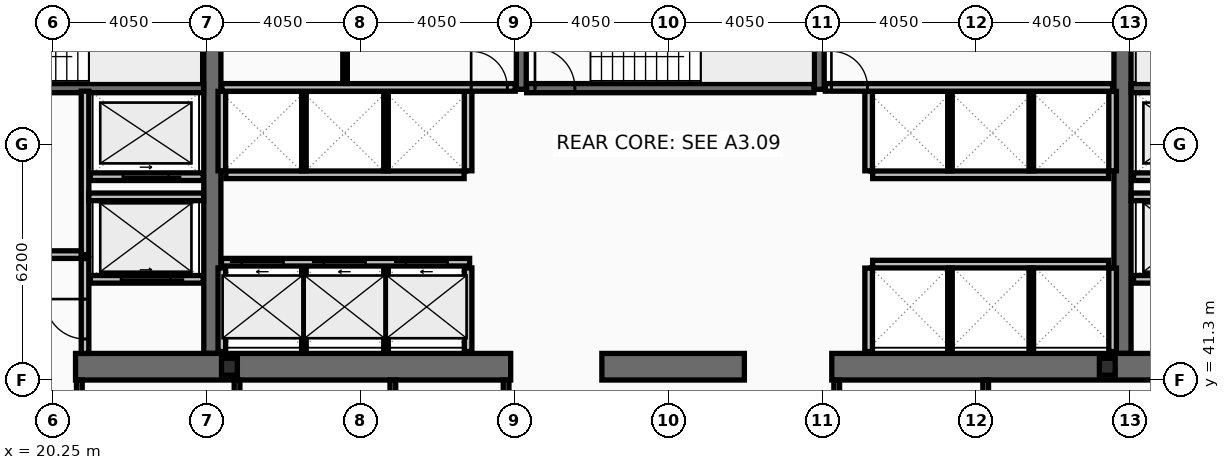
"""IFC4 building model, lengths in metres.
Left out: names, types, materials, properties, quantities, classifications, styles, units other than length and angle.
Written with IfcOpenShell. Run it as: python <this file> out.ifc"""

import sys

from ifc_helpers import new_model, si_unit, direction, frame, frame_2d, origin, origin_2d, place, context, subcontext, project, spatial, rectangle, i_section, extrude, element, fill, save


model = new_model("IFC4")
c1 = context("Model", 3, precision=1e-05, world=origin(), true_north=direction((0.0, 1.0)))
c2 = subcontext(c1, "Body", "Model", "MODEL_VIEW")
j1 = project(units=[si_unit("LENGTHUNIT", "METRE"), si_unit("PLANEANGLEUNIT", "RADIAN")], contexts=[c1])
p1 = place(None, origin())
s1 = spatial("IfcSite", under=j1, at=p1, CompositionType="ELEMENT")
p2 = place(p1, origin())
s2 = spatial("IfcBuilding", under=s1, at=p2, CompositionType="ELEMENT")
p3 = place(p2, frame((0.0, 0.0, 111.0)))
s3 = spatial("IfcBuildingStorey", under=s2, at=p3, CompositionType="ELEMENT", Elevation=111.0)
for number, where, z_axis, x_axis in (
    (1, (24.45, 42.0, 0.0), (0.0, 0.0, 1.0), (0.0, 1.0, 0.0)),
    (2, (48.4, 42.0, 0.0), (0.0, 0.0, 1.0), (0.0, 1.0, 0.0)),
):
    element("IfcWall", number, at=place(p3, frame(where, z_axis=z_axis, x_axis=x_axis)), inside=s3, PredefinedType="SHEAR", context=c2, shape_type="SweptSolid", body=[
        extrude(rectangle(XDim=11.0, YDim=0.45, at=frame_2d((5.5, 0.0))), origin(), (0.0, 0.0, 1.0), 3.44),
    ])
p4 = place(p3, frame((32.3, 41.65, 0.0), z_axis=(0.0, 0.0, 1.0), x_axis=(-1.0, 0.0, 0.0)))
e3 = element("IfcWall", 3, at=p4, inside=s3, PredefinedType="SHEAR", context=c2, shape_type="SweptSolid", body=[
    extrude(rectangle(XDim=11.45, YDim=0.7, at=frame_2d((5.725, 0.0))), origin(), (0.0, 0.0, 1.0), 3.44),
])
p5 = place(p3, frame((38.45, 41.65, 0.0), z_axis=(0.0, 0.0, 1.0), x_axis=(-1.0, 0.0, 0.0)))
e4 = element("IfcWall", 4, at=p5, inside=s3, PredefinedType="SHEAR", context=c2, shape_type="SweptSolid", body=[
    extrude(rectangle(XDim=3.75, YDim=0.7, at=frame_2d((1.875, 0.0))), origin(), (0.0, 0.0, 1.0), 3.44),
])
p6 = place(p3, frame((52.05, 41.65, 0.0), z_axis=(0.0, 0.0, 1.0), x_axis=(-1.0, 0.0, 0.0)))
e5 = element("IfcWall", 5, at=p6, inside=s3, PredefinedType="SHEAR", context=c2, shape_type="SweptSolid", body=[
    extrude(rectangle(XDim=11.3, YDim=0.7, at=frame_2d((5.65, 0.0))), origin(), (0.0, 0.0, 1.0), 3.44),
])
for number, where, z_axis, x_axis in (
    (6, (32.58, 48.95, 0.0), (0.0, 0.0, 1.0), (0.0, 1.0, 0.0)),
    (7, (40.42, 48.95, 0.0), (0.0, 0.0, 1.0), (0.0, 1.0, 0.0)),
):
    element("IfcWall", number, at=place(p3, frame(where, z_axis=z_axis, x_axis=x_axis)), inside=s3, PredefinedType="SHEAR", context=c2, shape_type="SweptSolid", body=[
        extrude(rectangle(XDim=4.05, YDim=0.26, at=frame_2d((2.025, 0.0))), origin(), (0.0, 0.0, 1.0), 3.44),
    ])
p7 = place(p3, frame((16.9, 48.98, 0.0), z_axis=(0.0, 0.0, 1.0), x_axis=(1.0, 0.0, 0.0)))
e8 = element("IfcWall", 8, at=p7, inside=s3, PredefinedType="SHEAR", context=c2, shape_type="SweptSolid", body=[
    extrude(rectangle(XDim=7.32, YDim=0.24, at=frame_2d((3.66, 0.0))), origin(), (0.0, 0.0, 1.0), 3.44),
])
p8 = place(p7, frame((0.22, 0.0, 0.0)))
e9 = element("IfcOpeningElement", 9, at=p8, cuts=e8, PredefinedType="OPENING", context=c2, shape_type="SweptSolid", body=[
    extrude(rectangle(XDim=1.05, YDim=2.15, at=frame_2d((0.525, 1.075))), frame((0.0, 0.13, 0.0), z_axis=(0.0, -1.0, 0.0), x_axis=(1.0, 0.0, 0.0)), (0.0, 0.0, 1.0), 0.26),
])
p9 = place(p3, frame((48.63, 48.98, 0.0), z_axis=(0.0, 0.0, 1.0), x_axis=(1.0, 0.0, 0.0)))
e10 = element("IfcWall", 10, at=p9, inside=s3, PredefinedType="SHEAR", context=c2, shape_type="SweptSolid", body=[
    extrude(rectangle(XDim=7.37, YDim=0.24, at=frame_2d((3.685, 0.0))), origin(), (0.0, 0.0, 1.0), 3.44),
])
p10 = place(p9, frame((6.1, 0.0, 0.0)))
e11 = element("IfcOpeningElement", 11, at=p10, cuts=e10, PredefinedType="OPENING", context=c2, shape_type="SweptSolid", body=[
    extrude(rectangle(XDim=1.05, YDim=2.15, at=frame_2d((0.525, 1.075))), frame((0.0, 0.13, 0.0), z_axis=(0.0, -1.0, 0.0), x_axis=(1.0, 0.0, 0.0)), (0.0, 0.0, 1.0), 0.26),
])
p11 = place(p3, frame((32.72, 48.98, 0.0), z_axis=(0.0, 0.0, 1.0), x_axis=(1.0, 0.0, 0.0)))
e12 = element("IfcWall", 12, at=p11, inside=s3, PredefinedType="SHEAR", context=c2, shape_type="SweptSolid", body=[
    extrude(rectangle(XDim=7.56, YDim=0.24, at=frame_2d((3.78, 0.0))), origin(), (0.0, 0.0, 1.0), 3.44),
])
p12 = place(p11, frame((0.22, 0.0, 0.0)))
e13 = element("IfcOpeningElement", 13, at=p12, cuts=e12, PredefinedType="OPENING", context=c2, shape_type="SweptSolid", body=[
    extrude(rectangle(XDim=1.05, YDim=2.15, at=frame_2d((0.525, 1.075))), frame((0.0, 0.13, 0.0), z_axis=(0.0, -1.0, 0.0), x_axis=(1.0, 0.0, 0.0)), (0.0, 0.0, 1.0), 0.26),
])
for number, where, z_axis, x_axis in (
    (14, (24.9, 41.65, 0.0), (0.0, 0.0, 1.0), (1.0, 0.0, 0.0)),
    (15, (48.0, 41.65, 0.0), (0.0, 0.0, 1.0), (1.0, 0.0, 0.0)),
):
    element("IfcColumn", number, at=place(p3, frame(where, z_axis=z_axis, x_axis=x_axis)), inside=s3, PredefinedType="COLUMN", context=c2, shape_type="SweptSolid", body=[
        extrude(i_section(OverallWidth=0.416, OverallDepth=0.446, WebThickness=0.039, FlangeThickness=0.063, at=origin_2d()), origin(), (0.0, 0.0, 1.0), 3.6),
    ])
p13 = place(p3, frame((24.69, 44.4, 0.0), z_axis=(0.0, 0.0, 1.0), x_axis=(1.0, 0.0, 0.0)))
e16 = element("IfcWall", 16, at=p13, inside=s3, PredefinedType="PARTITIONING", context=c2, shape_type="SweptSolid", body=[
    extrude(rectangle(XDim=6.53, YDim=0.2, at=frame_2d((3.265, 0.0))), origin(), (0.0, 0.0, 1.0), 3.44),
])
p14 = place(p13, frame((0.53, 0.0, 0.0)))
e17 = element("IfcOpeningElement", 17, at=p14, cuts=e16, PredefinedType="OPENING", context=c2, shape_type="SweptSolid", body=[
    extrude(rectangle(XDim=1.1, YDim=2.18, at=frame_2d((0.55, 1.09))), frame((0.0, 0.11, 0.0), z_axis=(0.0, -1.0, 0.0), x_axis=(1.0, 0.0, 0.0)), (0.0, 0.0, 1.0), 0.22),
])
p15 = place(p13, frame((2.69, 0.0, 0.0)))
e18 = element("IfcOpeningElement", 18, at=p15, cuts=e16, PredefinedType="OPENING", context=c2, shape_type="SweptSolid", body=[
    extrude(rectangle(XDim=1.1, YDim=2.18, at=frame_2d((0.55, 1.09))), frame((0.0, 0.11, 0.0), z_axis=(0.0, -1.0, 0.0), x_axis=(1.0, 0.0, 0.0)), (0.0, 0.0, 1.0), 0.22),
])
p16 = place(p13, frame((4.85, 0.0, 0.0)))
e19 = element("IfcOpeningElement", 19, at=p16, cuts=e16, PredefinedType="OPENING", context=c2, shape_type="SweptSolid", body=[
    extrude(rectangle(XDim=1.1, YDim=2.18, at=frame_2d((0.55, 1.09))), frame((0.0, 0.11, 0.0), z_axis=(0.0, -1.0, 0.0), x_axis=(1.0, 0.0, 0.0)), (0.0, 0.0, 1.0), 0.22),
])
p17 = place(p3, frame((51.61, 43.95, 0.0), z_axis=(0.0, 0.0, 1.0), x_axis=(-1.0, 0.0, 0.0)))
e20 = element("IfcWall", 20, at=p17, inside=s3, PredefinedType="PARTITIONING", context=c2, shape_type="SweptSolid", body=[
    extrude(rectangle(XDim=2.92, YDim=0.2, at=frame_2d((1.46, 0.0))), origin(), (0.0, 0.0, 1.0), 3.44),
])
p18 = place(p17, frame((0.81, 0.0, 0.0)))
e21 = element("IfcOpeningElement", 21, at=p18, cuts=e20, PredefinedType="OPENING", context=c2, shape_type="SweptSolid", body=[
    extrude(rectangle(XDim=1.3, YDim=2.18, at=frame_2d((0.65, 1.09))), frame((0.0, 0.11, 0.0), z_axis=(0.0, -1.0, 0.0), x_axis=(1.0, 0.0, 0.0)), (0.0, 0.0, 1.0), 0.22),
])
p19 = place(p3, frame((24.21, 43.95, 0.0), z_axis=(0.0, 0.0, 1.0), x_axis=(-1.0, 0.0, 0.0)))
e22 = element("IfcWall", 22, at=p19, inside=s3, PredefinedType="PARTITIONING", context=c2, shape_type="SweptSolid", body=[
    extrude(rectangle(XDim=2.97, YDim=0.2, at=frame_2d((1.485, 0.0))), origin(), (0.0, 0.0, 1.0), 3.44),
])
p20 = place(p19, frame((0.86, 0.0, 0.0)))
e23 = element("IfcOpeningElement", 23, at=p20, cuts=e22, PredefinedType="OPENING", context=c2, shape_type="SweptSolid", body=[
    extrude(rectangle(XDim=1.3, YDim=2.18, at=frame_2d((0.65, 1.09))), frame((0.0, 0.11, 0.0), z_axis=(0.0, -1.0, 0.0), x_axis=(1.0, 0.0, 0.0)), (0.0, 0.0, 1.0), 0.22),
])
p21 = place(p3, frame((51.61, 46.65, 0.0), z_axis=(0.0, 0.0, 1.0), x_axis=(-1.0, 0.0, 0.0)))
e24 = element("IfcWall", 24, at=p21, inside=s3, PredefinedType="PARTITIONING", context=c2, shape_type="SweptSolid", body=[
    extrude(rectangle(XDim=2.92, YDim=0.2, at=frame_2d((1.46, 0.0))), origin(), (0.0, 0.0, 1.0), 3.44),
])
p22 = place(p21, frame((0.86, 0.0, 0.0)))
e25 = element("IfcOpeningElement", 25, at=p22, cuts=e24, PredefinedType="OPENING", context=c2, shape_type="SweptSolid", body=[
    extrude(rectangle(XDim=1.2, YDim=2.18, at=frame_2d((0.6, 1.09))), frame((0.0, 0.11, 0.0), z_axis=(0.0, -1.0, 0.0), x_axis=(1.0, 0.0, 0.0)), (0.0, 0.0, 1.0), 0.22),
])
p23 = place(p3, frame((24.21, 46.65, 0.0), z_axis=(0.0, 0.0, 1.0), x_axis=(-1.0, 0.0, 0.0)))
e26 = element("IfcWall", 26, at=p23, inside=s3, PredefinedType="PARTITIONING", context=c2, shape_type="SweptSolid", body=[
    extrude(rectangle(XDim=2.97, YDim=0.2, at=frame_2d((1.485, 0.0))), origin(), (0.0, 0.0, 1.0), 3.44),
])
p24 = place(p23, frame((0.91, 0.0, 0.0)))
e27 = element("IfcOpeningElement", 27, at=p24, cuts=e26, PredefinedType="OPENING", context=c2, shape_type="SweptSolid", body=[
    extrude(rectangle(XDim=1.2, YDim=2.18, at=frame_2d((0.6, 1.09))), frame((0.0, 0.11, 0.0), z_axis=(0.0, -1.0, 0.0), x_axis=(1.0, 0.0, 0.0)), (0.0, 0.0, 1.0), 0.22),
])
p25 = place(p3, frame((21.1, 44.6, 0.0), z_axis=(0.0, 0.0, 1.0), x_axis=(0.0, 1.0, 0.0)))
e28 = element("IfcWall", 28, at=p25, inside=s3, PredefinedType="PARTITIONING", context=c2, shape_type="SweptSolid", body=[
    extrude(rectangle(XDim=4.3, YDim=0.2, at=frame_2d((2.15, 0.0))), origin(), (0.0, 0.0, 1.0), 3.44),
])
p26 = place(p3, frame((16.9, 44.6, 0.0), z_axis=(0.0, 0.0, 1.0), x_axis=(1.0, 0.0, 0.0)))
e29 = element("IfcWall", 29, at=p26, inside=s3, PredefinedType="PARTITIONING", context=c2, shape_type="SweptSolid", body=[
    extrude(rectangle(XDim=4.1, YDim=0.2, at=frame_2d((2.05, 0.0))), origin(), (0.0, 0.0, 1.0), 3.44),
])
p27 = place(p26, frame((1.25, 0.0, 0.0)))
e30 = element("IfcOpeningElement", 30, at=p27, cuts=e29, PredefinedType="OPENING", context=c2, shape_type="SweptSolid", body=[
    extrude(rectangle(XDim=1.05, YDim=2.15, at=frame_2d((0.525, 1.075))), frame((0.0, 0.11, 0.0), z_axis=(0.0, -1.0, 0.0), x_axis=(1.0, 0.0, 0.0)), (0.0, 0.0, 1.0), 0.22),
])
p28 = place(p3, frame((21.2, 46.12, 0.0), z_axis=(0.0, 0.0, 1.0), x_axis=(1.0, 0.0, 0.0)))
e31 = element("IfcWall", 31, at=p28, inside=s3, PredefinedType="PARTITIONING", context=c2, shape_type="SweptSolid", body=[
    extrude(rectangle(XDim=3.02, YDim=0.2, at=frame_2d((1.51, 0.0))), origin(), (0.0, 0.0, 1.0), 3.44),
])
p29 = place(p3, frame((21.1, 42.0, 0.0), z_axis=(0.0, 0.0, 1.0), x_axis=(0.0, 1.0, 0.0)))
e32 = element("IfcWall", 32, at=p29, inside=s3, PredefinedType="PARTITIONING", context=c2, shape_type="SweptSolid", body=[
    extrude(rectangle(XDim=2.495, YDim=0.2, at=frame_2d((1.248, 0.0))), origin(), (0.0, 0.0, 1.0), 3.44),
])
p30 = place(p29, frame((0.38, 0.0, 0.0)))
e33 = element("IfcOpeningElement", 33, at=p30, cuts=e32, PredefinedType="OPENING", context=c2, shape_type="SweptSolid", body=[
    extrude(rectangle(XDim=1.05, YDim=2.15, at=frame_2d((0.525, 1.075))), frame((0.0, 0.11, 0.0), z_axis=(0.0, -1.0, 0.0), x_axis=(1.0, 0.0, 0.0)), (0.0, 0.0, 1.0), 0.22),
])
p31 = place(p3, frame((48.63, 46.12, 0.0), z_axis=(0.0, 0.0, 1.0), x_axis=(1.0, 0.0, 0.0)))
e34 = element("IfcWall", 34, at=p31, inside=s3, PredefinedType="PARTITIONING", context=c2, shape_type="SweptSolid", body=[
    extrude(rectangle(XDim=3.07, YDim=0.2, at=frame_2d((1.535, 0.0))), origin(), (0.0, 0.0, 1.0), 3.44),
])
p32 = place(p3, frame((24.805, 46.7, 0.0), z_axis=(0.0, 0.0, 1.0), x_axis=(1.0, 0.0, 0.0)))
e35 = element("IfcWall", 35, at=p32, inside=s3, PredefinedType="PARTITIONING", context=c2, shape_type="SweptSolid", body=[
    extrude(rectangle(XDim=6.27, YDim=0.2, at=frame_2d((3.135, 0.0))), origin(), (0.0, 0.0, 1.0), 3.44),
])
for number, where, z_axis, x_axis in (
    (36, (24.7, 46.805, 0.0), (0.0, 0.0, 1.0), (0.0, 1.0, 0.0)),
    (37, (31.18, 46.805, 0.0), (0.0, 0.0, 1.0), (0.0, 1.0, 0.0)),
):
    element("IfcWall", number, at=place(p3, frame(where, z_axis=z_axis, x_axis=x_axis)), inside=s3, PredefinedType="PARTITIONING", context=c2, shape_type="SweptSolid", body=[
        extrude(rectangle(XDim=2.09, YDim=0.2, at=frame_2d((1.045, 0.0))), origin(), (0.0, 0.0, 1.0), 3.44),
    ])
for number, where, z_axis, x_axis in (
    (38, (26.86, 46.805, 0.0), (0.0, 0.0, 1.0), (0.0, 1.0, 0.0)),
    (39, (29.02, 46.805, 0.0), (0.0, 0.0, 1.0), (0.0, 1.0, 0.0)),
):
    element("IfcWall", number, at=place(p3, frame(where, z_axis=z_axis, x_axis=x_axis)), inside=s3, PredefinedType="PARTITIONING", context=c2, shape_type="SweptSolid", body=[
        extrude(rectangle(XDim=2.09, YDim=0.12, at=frame_2d((1.045, 0.0))), origin(), (0.0, 0.0, 1.0), 3.44),
    ])
for number, where, z_axis, x_axis in (
    (40, (24.7, 42.05, 0.0), (0.0, 0.0, 1.0), (0.0, 1.0, 0.0)),
    (41, (31.18, 42.05, 0.0), (0.0, 0.0, 1.0), (0.0, 1.0, 0.0)),
):
    element("IfcWall", number, at=place(p3, frame(where, z_axis=z_axis, x_axis=x_axis)), inside=s3, PredefinedType="PARTITIONING", context=c2, shape_type="SweptSolid", body=[
        extrude(rectangle(XDim=2.2, YDim=0.2, at=frame_2d((1.1, 0.0))), origin(), (0.0, 0.0, 1.0), 3.44),
    ])
for number, where, z_axis, x_axis in (
    (42, (26.86, 42.05, 0.0), (0.0, 0.0, 1.0), (0.0, 1.0, 0.0)),
    (43, (29.02, 42.05, 0.0), (0.0, 0.0, 1.0), (0.0, 1.0, 0.0)),
):
    element("IfcWall", number, at=place(p3, frame(where, z_axis=z_axis, x_axis=x_axis)), inside=s3, PredefinedType="PARTITIONING", context=c2, shape_type="SweptSolid", body=[
        extrude(rectangle(XDim=2.2, YDim=0.12, at=frame_2d((1.1, 0.0))), origin(), (0.0, 0.0, 1.0), 3.44),
    ])
p33 = place(p3, frame((41.825, 46.7, 0.0), z_axis=(0.0, 0.0, 1.0), x_axis=(1.0, 0.0, 0.0)))
e44 = element("IfcWall", 44, at=p33, inside=s3, PredefinedType="PARTITIONING", context=c2, shape_type="SweptSolid", body=[
    extrude(rectangle(XDim=6.21, YDim=0.2, at=frame_2d((3.105, 0.0))), origin(), (0.0, 0.0, 1.0), 3.44),
])
for number, where, z_axis, x_axis in (
    (45, (41.72, 46.805, 0.0), (0.0, 0.0, 1.0), (0.0, 1.0, 0.0)),
    (46, (48.14, 46.805, 0.0), (0.0, 0.0, 1.0), (0.0, 1.0, 0.0)),
):
    element("IfcWall", number, at=place(p3, frame(where, z_axis=z_axis, x_axis=x_axis)), inside=s3, PredefinedType="PARTITIONING", context=c2, shape_type="SweptSolid", body=[
        extrude(rectangle(XDim=2.09, YDim=0.2, at=frame_2d((1.045, 0.0))), origin(), (0.0, 0.0, 1.0), 3.44),
    ])
for number, where, z_axis, x_axis in (
    (47, (43.86, 46.805, 0.0), (0.0, 0.0, 1.0), (0.0, 1.0, 0.0)),
    (48, (46.0, 46.805, 0.0), (0.0, 0.0, 1.0), (0.0, 1.0, 0.0)),
):
    element("IfcWall", number, at=place(p3, frame(where, z_axis=z_axis, x_axis=x_axis)), inside=s3, PredefinedType="PARTITIONING", context=c2, shape_type="SweptSolid", body=[
        extrude(rectangle(XDim=2.09, YDim=0.12, at=frame_2d((1.045, 0.0))), origin(), (0.0, 0.0, 1.0), 3.44),
    ])
p34 = place(p3, frame((41.825, 44.35, 0.0), z_axis=(0.0, 0.0, 1.0), x_axis=(1.0, 0.0, 0.0)))
e49 = element("IfcWall", 49, at=p34, inside=s3, PredefinedType="PARTITIONING", context=c2, shape_type="SweptSolid", body=[
    extrude(rectangle(XDim=6.21, YDim=0.2, at=frame_2d((3.105, 0.0))), origin(), (0.0, 0.0, 1.0), 3.44),
])
for number, where, z_axis, x_axis in (
    (50, (41.72, 42.05, 0.0), (0.0, 0.0, 1.0), (0.0, 1.0, 0.0)),
    (51, (48.14, 42.05, 0.0), (0.0, 0.0, 1.0), (0.0, 1.0, 0.0)),
):
    element("IfcWall", number, at=place(p3, frame(where, z_axis=z_axis, x_axis=x_axis)), inside=s3, PredefinedType="PARTITIONING", context=c2, shape_type="SweptSolid", body=[
        extrude(rectangle(XDim=2.195, YDim=0.2, at=frame_2d((1.098, 0.0))), origin(), (0.0, 0.0, 1.0), 3.44),
    ])
for number, where, z_axis, x_axis in (
    (52, (43.86, 42.05, 0.0), (0.0, 0.0, 1.0), (0.0, 1.0, 0.0)),
    (53, (46.0, 42.05, 0.0), (0.0, 0.0, 1.0), (0.0, 1.0, 0.0)),
):
    element("IfcWall", number, at=place(p3, frame(where, z_axis=z_axis, x_axis=x_axis)), inside=s3, PredefinedType="PARTITIONING", context=c2, shape_type="SweptSolid", body=[
        extrude(rectangle(XDim=2.195, YDim=0.12, at=frame_2d((1.098, 0.0))), origin(), (0.0, 0.0, 1.0), 3.44),
    ])
p35 = place(p3, frame((24.7, 49.0, 0.0), z_axis=(0.0, 0.0, 1.0), x_axis=(1.0, 0.0, 0.0)))
e54 = element("IfcWall", 54, at=p35, inside=s3, PredefinedType="PARTITIONING", context=c2, shape_type="SweptSolid", body=[
    extrude(rectangle(XDim=7.72, YDim=0.2, at=frame_2d((3.86, 0.0))), origin(), (0.0, 0.0, 1.0), 3.44),
])
p36 = place(p35, frame((6.56, 0.0, 0.0)))
e55 = element("IfcOpeningElement", 55, at=p36, cuts=e54, PredefinedType="OPENING", context=c2, shape_type="SweptSolid", body=[
    extrude(rectangle(XDim=0.95, YDim=2.1, at=frame_2d((0.475, 1.05))), frame((0.0, 0.11, 0.0), z_axis=(0.0, -1.0, 0.0), x_axis=(1.0, 0.0, 0.0)), (0.0, 0.0, 1.0), 0.22),
])
p37 = place(p3, frame((27.942, 49.105, 0.0), z_axis=(0.0, 0.0, 1.0), x_axis=(0.0, 1.0, 0.0)))
e56 = element("IfcWall", 56, at=p37, inside=s3, PredefinedType="PARTITIONING", context=c2, shape_type="SweptSolid", body=[
    extrude(rectangle(XDim=3.69, YDim=0.12, at=frame_2d((1.845, 0.0))), origin(), (0.0, 0.0, 1.0), 3.44),
])
p38 = place(p37, frame((1.05, 0.0, 0.0)))
e57 = element("IfcOpeningElement", 57, at=p38, cuts=e56, PredefinedType="OPENING", context=c2, shape_type="SweptSolid", body=[
    extrude(rectangle(XDim=0.9, YDim=2.05, at=frame_2d((0.45, 1.025))), frame((0.0, 0.07, 0.0), z_axis=(0.0, -1.0, 0.0), x_axis=(1.0, 0.0, 0.0)), (0.0, 0.0, 1.0), 0.14),
])
p39 = place(p3, frame((40.58, 49.0, 0.0), z_axis=(0.0, 0.0, 1.0), x_axis=(1.0, 0.0, 0.0)))
e58 = element("IfcWall", 58, at=p39, inside=s3, PredefinedType="PARTITIONING", context=c2, shape_type="SweptSolid", body=[
    extrude(rectangle(XDim=7.56, YDim=0.2, at=frame_2d((3.78, 0.0))), origin(), (0.0, 0.0, 1.0), 3.44),
])
p40 = place(p39, frame((0.16, 0.0, 0.0)))
e59 = element("IfcOpeningElement", 59, at=p40, cuts=e58, PredefinedType="OPENING", context=c2, shape_type="SweptSolid", body=[
    extrude(rectangle(XDim=0.95, YDim=2.1, at=frame_2d((0.475, 1.05))), frame((0.0, 0.11, 0.0), z_axis=(0.0, -1.0, 0.0), x_axis=(1.0, 0.0, 0.0)), (0.0, 0.0, 1.0), 0.22),
])
p41 = place(p3, frame((20.95, 38.28, 0.0), z_axis=(0.0, 0.0, 1.0), x_axis=(0.0, 1.0, 0.0)))
e60 = element("IfcWall", 60, at=p41, inside=s3, PredefinedType="PARTITIONING", context=c2, shape_type="SweptSolid", body=[
    extrude(rectangle(XDim=3.02, YDim=0.15, at=frame_2d((1.51, 0.0))), origin(), (0.0, 0.0, 1.0), 3.44),
])
p42 = place(p3, frame((25.1, 38.28, 0.0), z_axis=(0.0, 0.0, 1.0), x_axis=(0.0, 1.0, 0.0)))
e61 = element("IfcWall", 61, at=p42, inside=s3, PredefinedType="PARTITIONING", context=c2, shape_type="SweptSolid", body=[
    extrude(rectangle(XDim=3.02, YDim=0.15, at=frame_2d((1.51, 0.0))), origin(), (0.0, 0.0, 1.0), 2.73),
])
for number, where, z_axis, x_axis in (
    (62, (29.2, 38.28, 0.0), (0.0, 0.0, 1.0), (0.0, 1.0, 0.0)),
    (63, (32.18, 38.28, 0.0), (0.0, 0.0, 1.0), (0.0, 1.0, 0.0)),
    (64, (40.88, 38.28, 0.0), (0.0, 0.0, 1.0), (0.0, 1.0, 0.0)),
    (65, (44.8, 38.28, 0.0), (0.0, 0.0, 1.0), (0.0, 1.0, 0.0)),
):
    element("IfcWall", number, at=place(p3, frame(where, z_axis=z_axis, x_axis=x_axis)), inside=s3, PredefinedType="PARTITIONING", context=c2, shape_type="SweptSolid", body=[
        extrude(rectangle(XDim=3.02, YDim=0.15, at=frame_2d((1.51, 0.0))), origin(), (0.0, 0.0, 1.0), 3.44),
    ])
p43 = place(p12, origin())
e66 = element("IfcDoor", 66, at=p43, inside=s3, OperationType="SINGLE_SWING_LEFT", PredefinedType="DOOR", context=c2, shape_type="SweptSolid", body=[
    extrude(rectangle(XDim=1.05, YDim=2.15, at=frame_2d((0.525, 1.075))), frame((0.0, 0.025, 0.0), z_axis=(0.0, -1.0, 0.0), x_axis=(1.0, 0.0, 0.0)), (0.0, 0.0, 1.0), 0.05),
])
fill(e13, e66)
p44 = place(p14, origin())
e67 = element("IfcDoor", 67, at=p44, inside=s3, OperationType="SLIDING_TO_LEFT", PredefinedType="DOOR", context=c2, shape_type="SweptSolid", body=[
    extrude(rectangle(XDim=1.1, YDim=2.18, at=frame_2d((0.55, 1.09))), frame((0.0, 0.025, 0.0), z_axis=(0.0, -1.0, 0.0), x_axis=(1.0, 0.0, 0.0)), (0.0, 0.0, 1.0), 0.05),
])
fill(e17, e67)
p45 = place(p15, origin())
e68 = element("IfcDoor", 68, at=p45, inside=s3, OperationType="SLIDING_TO_LEFT", PredefinedType="DOOR", context=c2, shape_type="SweptSolid", body=[
    extrude(rectangle(XDim=1.1, YDim=2.18, at=frame_2d((0.55, 1.09))), frame((0.0, 0.025, 0.0), z_axis=(0.0, -1.0, 0.0), x_axis=(1.0, 0.0, 0.0)), (0.0, 0.0, 1.0), 0.05),
])
fill(e18, e68)
p46 = place(p16, origin())
e69 = element("IfcDoor", 69, at=p46, inside=s3, OperationType="SLIDING_TO_LEFT", PredefinedType="DOOR", context=c2, shape_type="SweptSolid", body=[
    extrude(rectangle(XDim=1.1, YDim=2.18, at=frame_2d((0.55, 1.09))), frame((0.0, 0.025, 0.0), z_axis=(0.0, -1.0, 0.0), x_axis=(1.0, 0.0, 0.0)), (0.0, 0.0, 1.0), 0.05),
])
fill(e19, e69)
p47 = place(p20, origin())
e70 = element("IfcDoor", 70, at=p47, inside=s3, OperationType="SLIDING_TO_LEFT", PredefinedType="DOOR", context=c2, shape_type="SweptSolid", body=[
    extrude(rectangle(XDim=1.3, YDim=2.18, at=frame_2d((0.65, 1.09))), frame((0.0, 0.025, 0.0), z_axis=(0.0, -1.0, 0.0), x_axis=(1.0, 0.0, 0.0)), (0.0, 0.0, 1.0), 0.05),
])
fill(e23, e70)
p48 = place(p24, origin())
e71 = element("IfcDoor", 71, at=p48, inside=s3, OperationType="SLIDING_TO_LEFT", PredefinedType="DOOR", context=c2, shape_type="SweptSolid", body=[
    extrude(rectangle(XDim=1.2, YDim=2.18, at=frame_2d((0.6, 1.09))), frame((0.0, 0.025, 0.0), z_axis=(0.0, -1.0, 0.0), x_axis=(1.0, 0.0, 0.0)), (0.0, 0.0, 1.0), 0.05),
])
fill(e27, e71)
p49 = place(p30, origin())
e72 = element("IfcDoor", 72, at=p49, inside=s3, OperationType="SINGLE_SWING_RIGHT", PredefinedType="DOOR", context=c2, shape_type="SweptSolid", body=[
    extrude(rectangle(XDim=1.05, YDim=2.15, at=frame_2d((0.525, 1.075))), frame((0.0, 0.025, 0.0), z_axis=(0.0, -1.0, 0.0), x_axis=(1.0, 0.0, 0.0)), (0.0, 0.0, 1.0), 0.05),
])
fill(e33, e72)
p50 = place(p36, origin())
e73 = element("IfcDoor", 73, at=p50, inside=s3, OperationType="SINGLE_SWING_LEFT", PredefinedType="DOOR", context=c2, shape_type="SweptSolid", body=[
    extrude(rectangle(XDim=0.95, YDim=2.1, at=frame_2d((0.475, 1.05))), frame((0.0, 0.025, 0.0), z_axis=(0.0, -1.0, 0.0), x_axis=(1.0, 0.0, 0.0)), (0.0, 0.0, 1.0), 0.05),
])
fill(e55, e73)
p51 = place(p40, origin())
e74 = element("IfcDoor", 74, at=p51, inside=s3, OperationType="SINGLE_SWING_LEFT", PredefinedType="DOOR", context=c2, shape_type="SweptSolid", body=[
    extrude(rectangle(XDim=0.95, YDim=2.1, at=frame_2d((0.475, 1.05))), frame((0.0, 0.025, 0.0), z_axis=(0.0, -1.0, 0.0), x_axis=(1.0, 0.0, 0.0)), (0.0, 0.0, 1.0), 0.05),
])
fill(e59, e74)
save(model, sys.argv[1])
